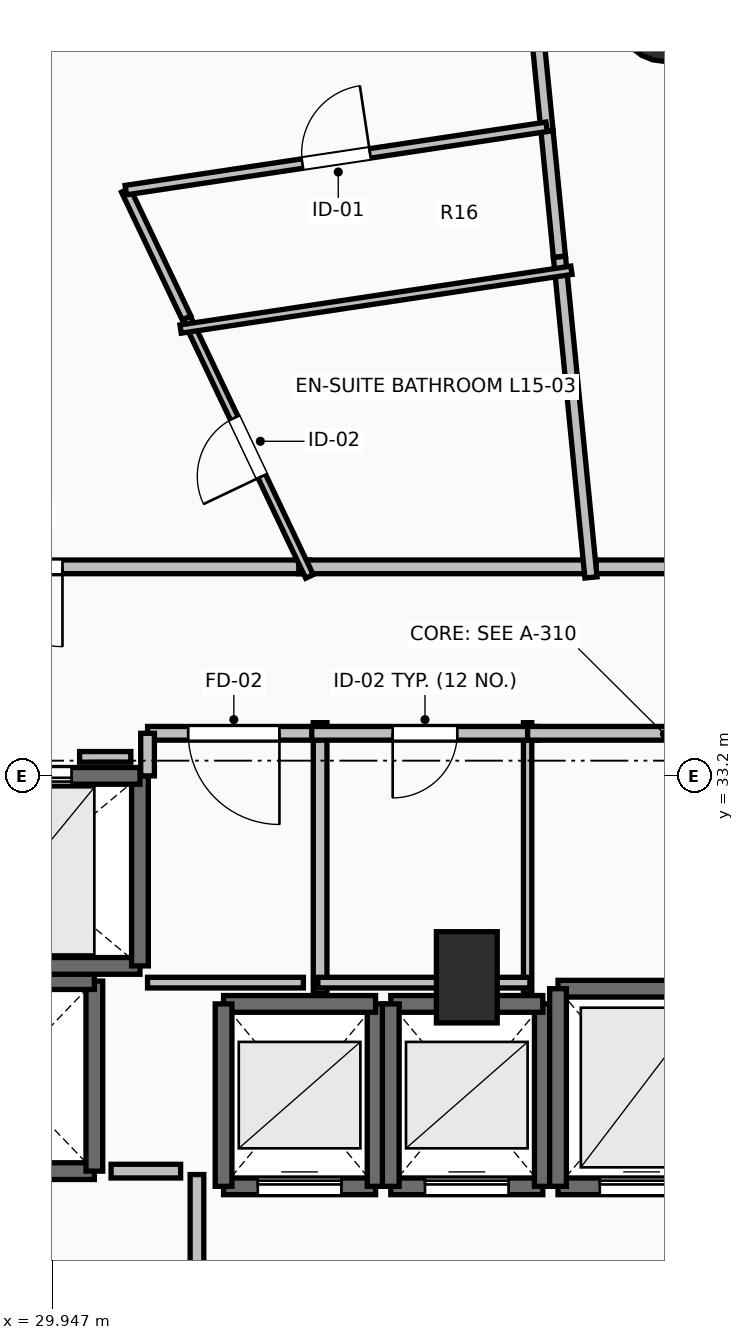
"""IFC4 building model, lengths in metres.
Left out: names, types, materials, properties, quantities, classifications, styles, units other than length and angle.
Written with IfcOpenShell. Run it as: python <this file> out.ifc"""

import sys

from ifc_helpers import new_model, si_unit, direction, frame, frame_2d, origin, origin_2d, place, context, subcontext, project, spatial, rectangle, circle, extrude, element, fill, save


model = new_model("IFC4")
c1 = context("Model", 3, precision=1e-05, world=origin(), true_north=direction((0.0, 1.0)))
c2 = subcontext(c1, "Body", "Model", "MODEL_VIEW")
j1 = project(units=[si_unit("LENGTHUNIT", "METRE"), si_unit("PLANEANGLEUNIT", "RADIAN")], contexts=[c1])
p1 = place(None, origin())
s1 = spatial("IfcSite", under=j1, at=p1, CompositionType="ELEMENT")
p2 = place(p1, origin())
s2 = spatial("IfcBuilding", under=s1, at=p2, CompositionType="ELEMENT")
p3 = place(p2, frame((0.0, 0.0, 59.0)))
s3 = spatial("IfcBuildingStorey", under=s2, at=p3, CompositionType="ELEMENT", Elevation=59.0)
p4 = place(p3, frame((38.0, 43.2, 0.0), z_axis=(0.0, 0.0, 1.0), x_axis=(0.0, 1.0, 0.0)))
e1 = element("IfcColumn", 1, at=p4, inside=s3, PredefinedType="COLUMN", context=c2, shape_type="SweptSolid", body=[
    extrude(circle(Radius=0.6, at=origin_2d()), origin(), (0.0, 0.0, 1.0), 3.5),
])
p5 = place(p3, frame((35.4, 30.55, 0.0), z_axis=(0.0, 0.0, 1.0), x_axis=(1.0, 0.0, 0.0)))
e2 = element("IfcColumn", 2, at=p5, inside=s3, PredefinedType="PILASTER", context=c2, shape_type="SweptSolid", body=[
    extrude(rectangle(XDim=0.8, YDim=1.2, at=origin_2d()), origin(), (0.0, 0.0, 1.0), 3.5),
])
p6 = place(p3, frame((32.2, 27.8, 0.0), z_axis=(0.0, 0.0, 1.0), x_axis=(1.0, 0.0, 0.0)))
e3 = element("IfcWall", 3, at=p6, inside=s3, PredefinedType="SOLIDWALL", context=c2, shape_type="SweptSolid", body=[
    extrude(rectangle(XDim=2.0, YDim=0.22, at=frame_2d((1.0, 0.0))), origin(), (0.0, 0.0, 1.0), 3.24),
])
p7 = place(p6, frame((0.45, 0.0, 0.0)))
e4 = element("IfcOpeningElement", 4, at=p7, cuts=e3, PredefinedType="OPENING", context=c2, shape_type="SweptSolid", body=[
    extrude(rectangle(XDim=1.1, YDim=2.2, at=frame_2d((0.55, 1.1))), frame((0.0, 0.125, 0.0), z_axis=(0.0, -1.0, 0.0), x_axis=(1.0, 0.0, 0.0)), (0.0, 0.0, 1.0), 0.25),
])
p8 = place(p3, frame((34.2, 27.8, 0.0), z_axis=(0.0, 0.0, 1.0), x_axis=(0.0, 1.0, 0.0)))
e5 = element("IfcWall", 5, at=p8, inside=s3, PredefinedType="SOLIDWALL", context=c2, shape_type="SweptSolid", body=[
    extrude(rectangle(XDim=2.4, YDim=0.22, at=frame_2d((1.2, 0.0))), origin(), (0.0, 0.0, 1.0), 3.24),
])
p9 = place(p3, frame((34.2, 30.2, 0.0), z_axis=(0.0, 0.0, 1.0), x_axis=(-1.0, 0.0, 0.0)))
e6 = element("IfcWall", 6, at=p9, inside=s3, PredefinedType="SOLIDWALL", context=c2, shape_type="SweptSolid", body=[
    extrude(rectangle(XDim=2.0, YDim=0.22, at=frame_2d((1.0, 0.0))), origin(), (0.0, 0.0, 1.0), 3.24),
])
p10 = place(p3, frame((32.2, 30.2, 0.0), z_axis=(0.0, 0.0, 1.0), x_axis=(0.0, -1.0, 0.0)))
e7 = element("IfcWall", 7, at=p10, inside=s3, PredefinedType="SOLIDWALL", context=c2, shape_type="SweptSolid", body=[
    extrude(rectangle(XDim=2.4, YDim=0.22, at=frame_2d((1.2, 0.0))), origin(), (0.0, 0.0, 1.0), 3.24),
])
p11 = place(p3, frame((34.4, 27.8, 0.0), z_axis=(0.0, 0.0, 1.0), x_axis=(1.0, 0.0, 0.0)))
e8 = element("IfcWall", 8, at=p11, inside=s3, PredefinedType="SOLIDWALL", context=c2, shape_type="SweptSolid", body=[
    extrude(rectangle(XDim=2.0, YDim=0.22, at=frame_2d((1.0, 0.0))), origin(), (0.0, 0.0, 1.0), 3.24),
])
p12 = place(p11, frame((0.45, 0.0, 0.0)))
e9 = element("IfcOpeningElement", 9, at=p12, cuts=e8, PredefinedType="OPENING", context=c2, shape_type="SweptSolid", body=[
    extrude(rectangle(XDim=1.1, YDim=2.2, at=frame_2d((0.55, 1.1))), frame((0.0, 0.125, 0.0), z_axis=(0.0, -1.0, 0.0), x_axis=(1.0, 0.0, 0.0)), (0.0, 0.0, 1.0), 0.25),
])
p13 = place(p3, frame((36.4, 27.8, 0.0), z_axis=(0.0, 0.0, 1.0), x_axis=(0.0, 1.0, 0.0)))
e10 = element("IfcWall", 10, at=p13, inside=s3, PredefinedType="SOLIDWALL", context=c2, shape_type="SweptSolid", body=[
    extrude(rectangle(XDim=2.4, YDim=0.22, at=frame_2d((1.2, 0.0))), origin(), (0.0, 0.0, 1.0), 3.24),
])
p14 = place(p3, frame((36.4, 30.2, 0.0), z_axis=(0.0, 0.0, 1.0), x_axis=(-1.0, 0.0, 0.0)))
e11 = element("IfcWall", 11, at=p14, inside=s3, PredefinedType="SOLIDWALL", context=c2, shape_type="SweptSolid", body=[
    extrude(rectangle(XDim=2.0, YDim=0.22, at=frame_2d((1.0, 0.0))), origin(), (0.0, 0.0, 1.0), 3.24),
])
p15 = place(p3, frame((34.4, 30.2, 0.0), z_axis=(0.0, 0.0, 1.0), x_axis=(0.0, -1.0, 0.0)))
e12 = element("IfcWall", 12, at=p15, inside=s3, PredefinedType="SOLIDWALL", context=c2, shape_type="SweptSolid", body=[
    extrude(rectangle(XDim=2.4, YDim=0.22, at=frame_2d((1.2, 0.0))), origin(), (0.0, 0.0, 1.0), 3.24),
])
p16 = place(p3, frame((36.6, 27.8, 0.0), z_axis=(0.0, 0.0, 1.0), x_axis=(1.0, 0.0, 0.0)))
e13 = element("IfcWall", 13, at=p16, inside=s3, PredefinedType="SOLIDWALL", context=c2, shape_type="SweptSolid", body=[
    extrude(rectangle(XDim=2.2, YDim=0.22, at=frame_2d((1.1, 0.0))), origin(), (0.0, 0.0, 1.0), 3.24),
])
p17 = place(p16, frame((0.55, 0.0, 0.0)))
e14 = element("IfcOpeningElement", 14, at=p17, cuts=e13, PredefinedType="OPENING", context=c2, shape_type="SweptSolid", body=[
    extrude(rectangle(XDim=1.1, YDim=2.2, at=frame_2d((0.55, 1.1))), frame((0.0, 0.125, 0.0), z_axis=(0.0, -1.0, 0.0), x_axis=(1.0, 0.0, 0.0)), (0.0, 0.0, 1.0), 0.25),
])
p18 = place(p3, frame((38.8, 30.4, 0.0), z_axis=(0.0, 0.0, 1.0), x_axis=(-1.0, 0.0, 0.0)))
e15 = element("IfcWall", 15, at=p18, inside=s3, PredefinedType="SOLIDWALL", context=c2, shape_type="SweptSolid", body=[
    extrude(rectangle(XDim=2.2, YDim=0.22, at=frame_2d((1.1, 0.0))), origin(), (0.0, 0.0, 1.0), 3.24),
])
p19 = place(p3, frame((36.6, 30.4, 0.0), z_axis=(0.0, 0.0, 1.0), x_axis=(0.0, -1.0, 0.0)))
e16 = element("IfcWall", 16, at=p19, inside=s3, PredefinedType="SOLIDWALL", context=c2, shape_type="SweptSolid", body=[
    extrude(rectangle(XDim=2.6, YDim=0.22, at=frame_2d((1.3, 0.0))), origin(), (0.0, 0.0, 1.0), 3.24),
])
p20 = place(p3, frame((28.1, 28.0, 0.0), z_axis=(0.0, 0.0, 1.0), x_axis=(1.0, 0.0, 0.0)))
e17 = element("IfcWall", 17, at=p20, inside=s3, PredefinedType="SHEAR", context=c2, shape_type="SweptSolid", body=[
    extrude(rectangle(XDim=2.4, YDim=0.22, at=frame_2d((1.2, 0.0))), origin(), (0.0, 0.0, 1.0), 3.24),
])
p21 = place(p20, frame((0.6, 0.0, 0.0)))
e18 = element("IfcOpeningElement", 18, at=p21, cuts=e17, PredefinedType="OPENING", context=c2, shape_type="SweptSolid", body=[
    extrude(rectangle(XDim=1.2, YDim=2.2, at=frame_2d((0.6, 1.1))), frame((0.0, 0.125, 0.0), z_axis=(0.0, -1.0, 0.0), x_axis=(1.0, 0.0, 0.0)), (0.0, 0.0, 1.0), 0.25),
])
p22 = place(p3, frame((30.5, 28.0, 0.0), z_axis=(0.0, 0.0, 1.0), x_axis=(0.0, 1.0, 0.0)))
e19 = element("IfcWall", 19, at=p22, inside=s3, PredefinedType="SHEAR", context=c2, shape_type="SweptSolid", body=[
    extrude(rectangle(XDim=2.5, YDim=0.22, at=frame_2d((1.25, 0.0))), origin(), (0.0, 0.0, 1.0), 3.24),
])
p23 = place(p3, frame((30.5, 30.5, 0.0), z_axis=(0.0, 0.0, 1.0), x_axis=(-1.0, 0.0, 0.0)))
e20 = element("IfcWall", 20, at=p23, inside=s3, PredefinedType="SHEAR", context=c2, shape_type="SweptSolid", body=[
    extrude(rectangle(XDim=2.4, YDim=0.22, at=frame_2d((1.2, 0.0))), origin(), (0.0, 0.0, 1.0), 3.24),
])
p24 = place(p3, frame((28.1, 30.7, 0.0), z_axis=(0.0, 0.0, 1.0), x_axis=(1.0, 0.0, 0.0)))
e21 = element("IfcWall", 21, at=p24, inside=s3, PredefinedType="SOLIDWALL", context=c2, shape_type="SweptSolid", body=[
    extrude(rectangle(XDim=3.0, YDim=0.22, at=frame_2d((1.5, 0.0))), origin(), (0.0, 0.0, 1.0), 3.24),
])
p25 = place(p3, frame((31.1, 30.7, 0.0), z_axis=(0.0, 0.0, 1.0), x_axis=(0.0, 1.0, 0.0)))
e22 = element("IfcWall", 22, at=p25, inside=s3, PredefinedType="SOLIDWALL", context=c2, shape_type="SweptSolid", body=[
    extrude(rectangle(XDim=2.5, YDim=0.22, at=frame_2d((1.25, 0.0))), origin(), (0.0, 0.0, 1.0), 3.24),
])
p26 = place(p3, frame((31.1, 33.2, 0.0), z_axis=(0.0, 0.0, 1.0), x_axis=(-1.0, 0.0, 0.0)))
e23 = element("IfcWall", 23, at=p26, inside=s3, PredefinedType="SOLIDWALL", context=c2, shape_type="SweptSolid", body=[
    extrude(rectangle(XDim=3.0, YDim=0.22, at=frame_2d((1.5, 0.0))), origin(), (0.0, 0.0, 1.0), 3.24),
])
p27 = place(p26, frame((0.9, 0.0, 0.0)))
e24 = element("IfcOpeningElement", 24, at=p27, cuts=e23, PredefinedType="OPENING", context=c2, shape_type="SweptSolid", body=[
    extrude(rectangle(XDim=1.2, YDim=2.2, at=frame_2d((0.6, 1.1))), frame((0.0, 0.125, 0.0), z_axis=(0.0, -1.0, 0.0), x_axis=(1.0, 0.0, 0.0)), (0.0, 0.0, 1.0), 0.25),
])
p28 = place(p3, frame((31.85, 24.045, 0.0), z_axis=(0.0, 0.0, 1.0), x_axis=(0.0, 1.0, 0.0)))
e25 = element("IfcWall", 25, at=p28, inside=s3, PredefinedType="PARTITIONING", context=c2, shape_type="SweptSolid", body=[
    extrude(rectangle(XDim=3.91, YDim=0.18, at=frame_2d((1.955, 0.0))), origin(), (0.0, 0.0, 1.0), 3.24),
])
p29 = place(p28, frame((1.355, 0.0, 0.0)))
e26 = element("IfcOpeningElement", 26, at=p29, cuts=e25, PredefinedType="OPENING", context=c2, shape_type="SweptSolid", body=[
    extrude(rectangle(XDim=1.2, YDim=2.15, at=frame_2d((0.6, 1.075))), frame((0.0, 0.105, 0.0), z_axis=(0.0, -1.0, 0.0), x_axis=(1.0, 0.0, 0.0)), (0.0, 0.0, 1.0), 0.21),
])
p30 = place(p3, frame((33.47, 30.34, 0.0), z_axis=(0.0, 0.0, 1.0), x_axis=(0.0, 1.0, 0.0)))
e27 = element("IfcWall", 27, at=p30, inside=s3, PredefinedType="PARTITIONING", context=c2, shape_type="SweptSolid", body=[
    extrude(rectangle(XDim=3.56, YDim=0.18, at=frame_2d((1.78, 0.0))), origin(), (0.0, 0.0, 1.0), 3.24),
])
p31 = place(p3, frame((33.47, 33.76, 0.0), z_axis=(0.0, 0.0, 1.0), x_axis=(-1.0, 0.0, 0.0)))
e28 = element("IfcWall", 28, at=p31, inside=s3, PredefinedType="PARTITIONING", context=c2, shape_type="SweptSolid", body=[
    extrude(rectangle(XDim=2.27, YDim=0.18, at=frame_2d((1.135, 0.0))), origin(), (0.0, 0.0, 1.0), 3.24),
])
p32 = place(p31, frame((0.535, 0.0, 0.0)))
e29 = element("IfcOpeningElement", 29, at=p32, cuts=e28, PredefinedType="OPENING", context=c2, shape_type="SweptSolid", body=[
    extrude(rectangle(XDim=1.2, YDim=2.15, at=frame_2d((0.6, 1.075))), frame((0.0, 0.105, 0.0), z_axis=(0.0, -1.0, 0.0), x_axis=(1.0, 0.0, 0.0)), (0.0, 0.0, 1.0), 0.21),
])
p33 = place(p3, frame((31.2, 33.76, 0.0), z_axis=(0.0, 0.0, 1.0), x_axis=(0.0, -1.0, 0.0)))
e30 = element("IfcWall", 30, at=p33, inside=s3, PredefinedType="PARTITIONING", context=c2, shape_type="SweptSolid", body=[
    extrude(rectangle(XDim=0.56, YDim=0.18, at=frame_2d((0.28, 0.0))), origin(), (0.0, 0.0, 1.0), 3.24),
])
p34 = place(p3, frame((36.2, 30.34, 0.0), z_axis=(0.0, 0.0, 1.0), x_axis=(0.0, 1.0, 0.0)))
e31 = element("IfcWall", 31, at=p34, inside=s3, PredefinedType="PARTITIONING", context=c2, shape_type="SweptSolid", body=[
    extrude(rectangle(XDim=3.56, YDim=0.11, at=frame_2d((1.78, 0.0))), origin(), (0.0, 0.0, 1.0), 2.432),
])
p35 = place(p3, frame((36.34, 33.76, 0.0), z_axis=(0.0, 0.0, 1.0), x_axis=(-1.0, 0.0, 0.0)))
e32 = element("IfcWall", 32, at=p35, inside=s3, PredefinedType="PARTITIONING", context=c2, shape_type="SweptSolid", body=[
    extrude(rectangle(XDim=2.98, YDim=0.18, at=frame_2d((1.49, 0.0))), origin(), (0.0, 0.0, 1.0), 3.24),
])
p36 = place(p35, frame((1.065, 0.0, 0.0)))
e33 = element("IfcOpeningElement", 33, at=p36, cuts=e32, PredefinedType="OPENING", context=c2, shape_type="SweptSolid", body=[
    extrude(rectangle(XDim=0.85, YDim=2.1, at=frame_2d((0.425, 1.05))), frame((0.0, 0.105, 0.0), z_axis=(0.0, -1.0, 0.0), x_axis=(1.0, 0.0, 0.0)), (0.0, 0.0, 1.0), 0.21),
])
p37 = place(p3, frame((41.04, 33.76, 0.0), z_axis=(0.0, 0.0, 1.0), x_axis=(-1.0, 0.0, 0.0)))
e34 = element("IfcWall", 34, at=p37, inside=s3, PredefinedType="PARTITIONING", context=c2, shape_type="SweptSolid", body=[
    extrude(rectangle(XDim=4.84, YDim=0.18, at=frame_2d((2.42, 0.0))), origin(), (0.0, 0.0, 1.0), 3.24),
])
p38 = place(p37, frame((1.995, 0.0, 0.0)))
e35 = element("IfcOpeningElement", 35, at=p38, cuts=e34, PredefinedType="OPENING", context=c2, shape_type="SweptSolid", body=[
    extrude(rectangle(XDim=0.85, YDim=2.1, at=frame_2d((0.425, 1.05))), frame((0.0, 0.105, 0.0), z_axis=(0.0, -1.0, 0.0), x_axis=(1.0, 0.0, 0.0)), (0.0, 0.0, 1.0), 0.21),
])
p39 = place(p3, frame((41.602, 35.95, 0.0), z_axis=(0.0, 0.0, 1.0), x_axis=(-1.0, 0.0, 0.0)))
e36 = element("IfcWall", 36, at=p39, inside=s3, PredefinedType="PARTITIONING", context=c2, shape_type="SweptSolid", body=[
    extrude(rectangle(XDim=4.642, YDim=0.18, at=frame_2d((2.321, 0.0))), origin(), (0.0, 0.0, 1.0), 3.24),
])
p40 = place(p39, frame((1.796, 0.0, 0.0)))
e37 = element("IfcOpeningElement", 37, at=p40, cuts=e36, PredefinedType="OPENING", context=c2, shape_type="SweptSolid", body=[
    extrude(rectangle(XDim=1.05, YDim=2.2, at=frame_2d((0.525, 1.1))), frame((0.0, 0.105, 0.0), z_axis=(0.0, -1.0, 0.0), x_axis=(1.0, 0.0, 0.0)), (0.0, 0.0, 1.0), 0.21),
])
p41 = place(p3, frame((33.33, 35.95, 0.0), z_axis=(0.0, 0.0, 1.0), x_axis=(-1.0, 0.0, 0.0)))
e38 = element("IfcWall", 38, at=p41, inside=s3, PredefinedType="PARTITIONING", context=c2, shape_type="SweptSolid", body=[
    extrude(rectangle(XDim=7.549, YDim=0.18, at=frame_2d((3.774, 0.0))), origin(), (0.0, 0.0, 1.0), 2.432),
])
p42 = place(p41, frame((3.25, 0.0, 0.0)))
e39 = element("IfcOpeningElement", 39, at=p42, cuts=e38, PredefinedType="OPENING", context=c2, shape_type="SweptSolid", body=[
    extrude(rectangle(XDim=1.05, YDim=2.2, at=frame_2d((0.525, 1.1))), frame((0.0, 0.105, 0.0), z_axis=(0.0, -1.0, 0.0), x_axis=(1.0, 0.0, 0.0)), (0.0, 0.0, 1.0), 0.21),
])
p43 = place(p3, frame((37.1, 35.95, 0.0), z_axis=(0.0, 0.0, 1.0), x_axis=(-1.0, 0.0, 0.0)))
e40 = element("IfcWall", 40, at=p43, inside=s3, PredefinedType="PARTITIONING", context=c2, shape_type="SweptSolid", body=[
    extrude(rectangle(XDim=3.91, YDim=0.18, at=frame_2d((1.955, 0.0))), origin(), (0.0, 0.0, 1.0), 3.24),
])
p44 = place(p3, frame((36.074, 45.554, 0.0), z_axis=(0.0, 0.0, 1.0), x_axis=(0.098125465648, -0.995174051607, 0.0)))
e41 = element("IfcWall", 41, at=p44, inside=s3, PredefinedType="PARTITIONING", context=c2, shape_type="SweptSolid", body=[
    extrude(rectangle(XDim=3.894, YDim=0.16, at=frame_2d((1.947, 0.0))), origin(), (0.0, 0.0, 1.0), 2.432),
])
p45 = place(p3, frame((36.618, 40.03, 0.0), z_axis=(0.0, 0.0, 1.0), x_axis=(0.09794716995, -0.995191615669, 0.0)))
e42 = element("IfcWall", 42, at=p45, inside=s3, PredefinedType="PARTITIONING", context=c2, shape_type="SweptSolid", body=[
    extrude(rectangle(XDim=4.24, YDim=0.16, at=frame_2d((2.12, 0.0))), origin(), (0.0, 0.0, 1.0), 2.929),
])
p46 = place(p3, frame((36.456, 41.679, 0.0), z_axis=(0.0, 0.0, 1.0), x_axis=(0.098146679276, -0.995171959687, 0.0)))
e43 = element("IfcWall", 43, at=p46, inside=s3, PredefinedType="PARTITIONING", context=c2, shape_type="SweptSolid", body=[
    extrude(rectangle(XDim=1.657, YDim=0.16, at=frame_2d((0.828, 0.0))), origin(), (0.0, 0.0, 1.0), 2.432),
])
p47 = place(p3, frame((33.33, 35.823, 0.0), z_axis=(0.0, 0.0, 1.0), x_axis=(-0.429339722165, 0.903143068938, 0.0)))
e44 = element("IfcWall", 44, at=p47, inside=s3, PredefinedType="PARTITIONING", context=c2, shape_type="SweptSolid", body=[
    extrude(rectangle(XDim=3.767, YDim=0.11, at=frame_2d((1.883, 0.0))), origin(), (0.0, 0.0, 1.0), 2.432),
])
p48 = place(p47, frame((1.458, 0.0, 0.0)))
e45 = element("IfcOpeningElement", 45, at=p48, cuts=e44, PredefinedType="OPENING", context=c2, shape_type="SweptSolid", body=[
    extrude(rectangle(XDim=0.85, YDim=2.1, at=frame_2d((0.425, 1.05))), frame((0.0, 0.07, 0.0), z_axis=(0.0, -1.0, 0.0), x_axis=(1.0, 0.0, 0.0)), (0.0, 0.0, 1.0), 0.14),
])
p49 = place(p3, frame((31.713, 39.225, 0.0), z_axis=(0.0, 0.0, 1.0), x_axis=(-0.429281598359, 0.90317069777, 0.0)))
e46 = element("IfcWall", 46, at=p49, inside=s3, PredefinedType="PARTITIONING", context=c2, shape_type="SweptSolid", body=[
    extrude(rectangle(XDim=1.861, YDim=0.125, at=frame_2d((0.93, 0.0))), origin(), (0.0, 0.0, 1.0), 2.886),
])
p50 = place(p3, frame((30.914, 40.906, 0.0), z_axis=(0.0, 0.0, 1.0), x_axis=(0.988867472121, 0.148798933401, 0.0)))
e47 = element("IfcWall", 47, at=p50, inside=s3, PredefinedType="PARTITIONING", context=c2, shape_type="SweptSolid", body=[
    extrude(rectangle(XDim=5.598, YDim=0.125, at=frame_2d((2.799, 0.0))), origin(), (0.0, 0.0, 1.0), 2.432),
])
p51 = place(p50, frame((2.349, 0.0, 0.0)))
e48 = element("IfcOpeningElement", 48, at=p51, cuts=e47, PredefinedType="OPENING", context=c2, shape_type="SweptSolid", body=[
    extrude(rectangle(XDim=0.9, YDim=2.1, at=frame_2d((0.45, 1.05))), frame((0.0, 0.077, 0.0), z_axis=(0.0, -1.0, 0.0), x_axis=(1.0, 0.0, 0.0)), (0.0, 0.0, 1.0), 0.155),
])
p52 = place(p3, frame((36.776, 39.852, 0.0), z_axis=(0.0, 0.0, 1.0), x_axis=(-0.988868403521, -0.148792743496, 0.0)))
e49 = element("IfcWall", 49, at=p52, inside=s3, PredefinedType="PARTITIONING", context=c2, shape_type="SweptSolid", body=[
    extrude(rectangle(XDim=5.2, YDim=0.11, at=frame_2d((2.6, 0.0))), origin(), (0.0, 0.0, 1.0), 2.432),
])
p53 = place(p3, frame((31.635, 28.0, 0.0), z_axis=(0.0, 0.0, 1.0), x_axis=(-1.0, 0.0, 0.0)))
e50 = element("IfcWall", 50, at=p53, inside=s3, PredefinedType="PARTITIONING", context=c2, shape_type="SweptSolid", body=[
    extrude(rectangle(XDim=0.915, YDim=0.18, at=frame_2d((0.458, 0.0))), origin(), (0.0, 0.0, 1.0), 3.24),
])
p54 = place(p3, frame((31.2, 30.48, 0.0), z_axis=(0.0, 0.0, 1.0), x_axis=(1.0, 0.0, 0.0)))
e51 = element("IfcWall", 51, at=p54, inside=s3, PredefinedType="PARTITIONING", context=c2, shape_type="SweptSolid", body=[
    extrude(rectangle(XDim=2.05, YDim=0.14, at=frame_2d((1.025, 0.0))), origin(), (0.0, 0.0, 1.0), 3.24),
])
p55 = place(p3, frame((33.44, 30.48, 0.0), z_axis=(0.0, 0.0, 1.0), x_axis=(1.0, 0.0, 0.0)))
e52 = element("IfcWall", 52, at=p55, inside=s3, PredefinedType="PARTITIONING", context=c2, shape_type="SweptSolid", body=[
    extrude(rectangle(XDim=2.79, YDim=0.14, at=frame_2d((1.395, 0.0))), origin(), (0.0, 0.0, 1.0), 2.432),
])
p56 = place(p3, frame((30.306, 33.45, 0.0), z_axis=(0.0, 0.0, 1.0), x_axis=(1.0, 0.0, 0.0)))
e53 = element("IfcWall", 53, at=p56, inside=s3, PredefinedType="PARTITIONING", context=c2, shape_type="SweptSolid", body=[
    extrude(rectangle(XDim=0.674, YDim=0.14, at=frame_2d((0.337, 0.0))), origin(), (0.0, 0.0, 1.0), 3.24),
])
p57 = place(p7, origin())
e54 = element("IfcDoor", 54, at=p57, inside=s3, OperationType="SLIDING_TO_LEFT", PredefinedType="DOOR", context=c2, shape_type="SweptSolid", body=[
    extrude(rectangle(XDim=1.1, YDim=2.2, at=frame_2d((0.55, 1.1))), frame((0.0, 0.025, 0.0), z_axis=(0.0, -1.0, 0.0), x_axis=(1.0, 0.0, 0.0)), (0.0, 0.0, 1.0), 0.05),
])
fill(e4, e54)
p58 = place(p12, origin())
e55 = element("IfcDoor", 55, at=p58, inside=s3, OperationType="SLIDING_TO_LEFT", PredefinedType="DOOR", context=c2, shape_type="SweptSolid", body=[
    extrude(rectangle(XDim=1.1, YDim=2.2, at=frame_2d((0.55, 1.1))), frame((0.0, 0.025, 0.0), z_axis=(0.0, -1.0, 0.0), x_axis=(1.0, 0.0, 0.0)), (0.0, 0.0, 1.0), 0.05),
])
fill(e9, e55)
p59 = place(p17, origin())
e56 = element("IfcDoor", 56, at=p59, inside=s3, OperationType="SLIDING_TO_LEFT", PredefinedType="DOOR", context=c2, shape_type="SweptSolid", body=[
    extrude(rectangle(XDim=1.1, YDim=2.2, at=frame_2d((0.55, 1.1))), frame((0.0, 0.025, 0.0), z_axis=(0.0, -1.0, 0.0), x_axis=(1.0, 0.0, 0.0)), (0.0, 0.0, 1.0), 0.05),
])
fill(e14, e56)
p60 = place(p27, origin())
e57 = element("IfcDoor", 57, at=p60, inside=s3, OperationType="SLIDING_TO_LEFT", PredefinedType="DOOR", context=c2, shape_type="SweptSolid", body=[
    extrude(rectangle(XDim=1.2, YDim=2.2, at=frame_2d((0.6, 1.1))), frame((0.0, 0.025, 0.0), z_axis=(0.0, -1.0, 0.0), x_axis=(1.0, 0.0, 0.0)), (0.0, 0.0, 1.0), 0.05),
])
fill(e24, e57)
p61 = place(p32, origin())
e58 = element("IfcDoor", 58, at=p61, inside=s3, OperationType="SINGLE_SWING_LEFT", PredefinedType="DOOR", context=c2, shape_type="SweptSolid", body=[
    extrude(rectangle(XDim=1.2, YDim=2.15, at=frame_2d((0.6, 1.075))), frame((0.0, 0.025, 0.0), z_axis=(0.0, -1.0, 0.0), x_axis=(1.0, 0.0, 0.0)), (0.0, 0.0, 1.0), 0.05),
])
fill(e29, e58)
p62 = place(p36, origin())
e59 = element("IfcDoor", 59, at=p62, inside=s3, OperationType="SINGLE_SWING_RIGHT", PredefinedType="DOOR", context=c2, shape_type="SweptSolid", body=[
    extrude(rectangle(XDim=0.85, YDim=2.1, at=frame_2d((0.425, 1.05))), frame((0.0, 0.025, 0.0), z_axis=(0.0, -1.0, 0.0), x_axis=(1.0, 0.0, 0.0)), (0.0, 0.0, 1.0), 0.05),
])
fill(e33, e59)
p63 = place(p42, origin())
e60 = element("IfcDoor", 60, at=p63, inside=s3, OperationType="SINGLE_SWING_LEFT", PredefinedType="DOOR", context=c2, shape_type="SweptSolid", body=[
    extrude(rectangle(XDim=1.05, YDim=2.2, at=frame_2d((0.525, 1.1))), frame((0.0, 0.025, 0.0), z_axis=(0.0, -1.0, 0.0), x_axis=(1.0, 0.0, 0.0)), (0.0, 0.0, 1.0), 0.05),
])
fill(e39, e60)
p64 = place(p48, origin())
e61 = element("IfcDoor", 61, at=p64, inside=s3, OperationType="SINGLE_SWING_LEFT", PredefinedType="DOOR", context=c2, shape_type="SweptSolid", body=[
    extrude(rectangle(XDim=0.85, YDim=2.1, at=frame_2d((0.425, 1.05))), frame((0.0, 0.025, 0.0), z_axis=(0.0, -1.0, 0.0), x_axis=(1.0, 0.0, 0.0)), (0.0, 0.0, 1.0), 0.05),
])
fill(e45, e61)
p65 = place(p51, origin())
e62 = element("IfcDoor", 62, at=p65, inside=s3, OperationType="SINGLE_SWING_RIGHT", PredefinedType="DOOR", context=c2, shape_type="SweptSolid", body=[
    extrude(rectangle(XDim=0.9, YDim=2.1, at=frame_2d((0.45, 1.05))), frame((0.0, 0.025, 0.0), z_axis=(0.0, -1.0, 0.0), x_axis=(1.0, 0.0, 0.0)), (0.0, 0.0, 1.0), 0.05),
])
fill(e48, e62)
save(model, sys.argv[1])
